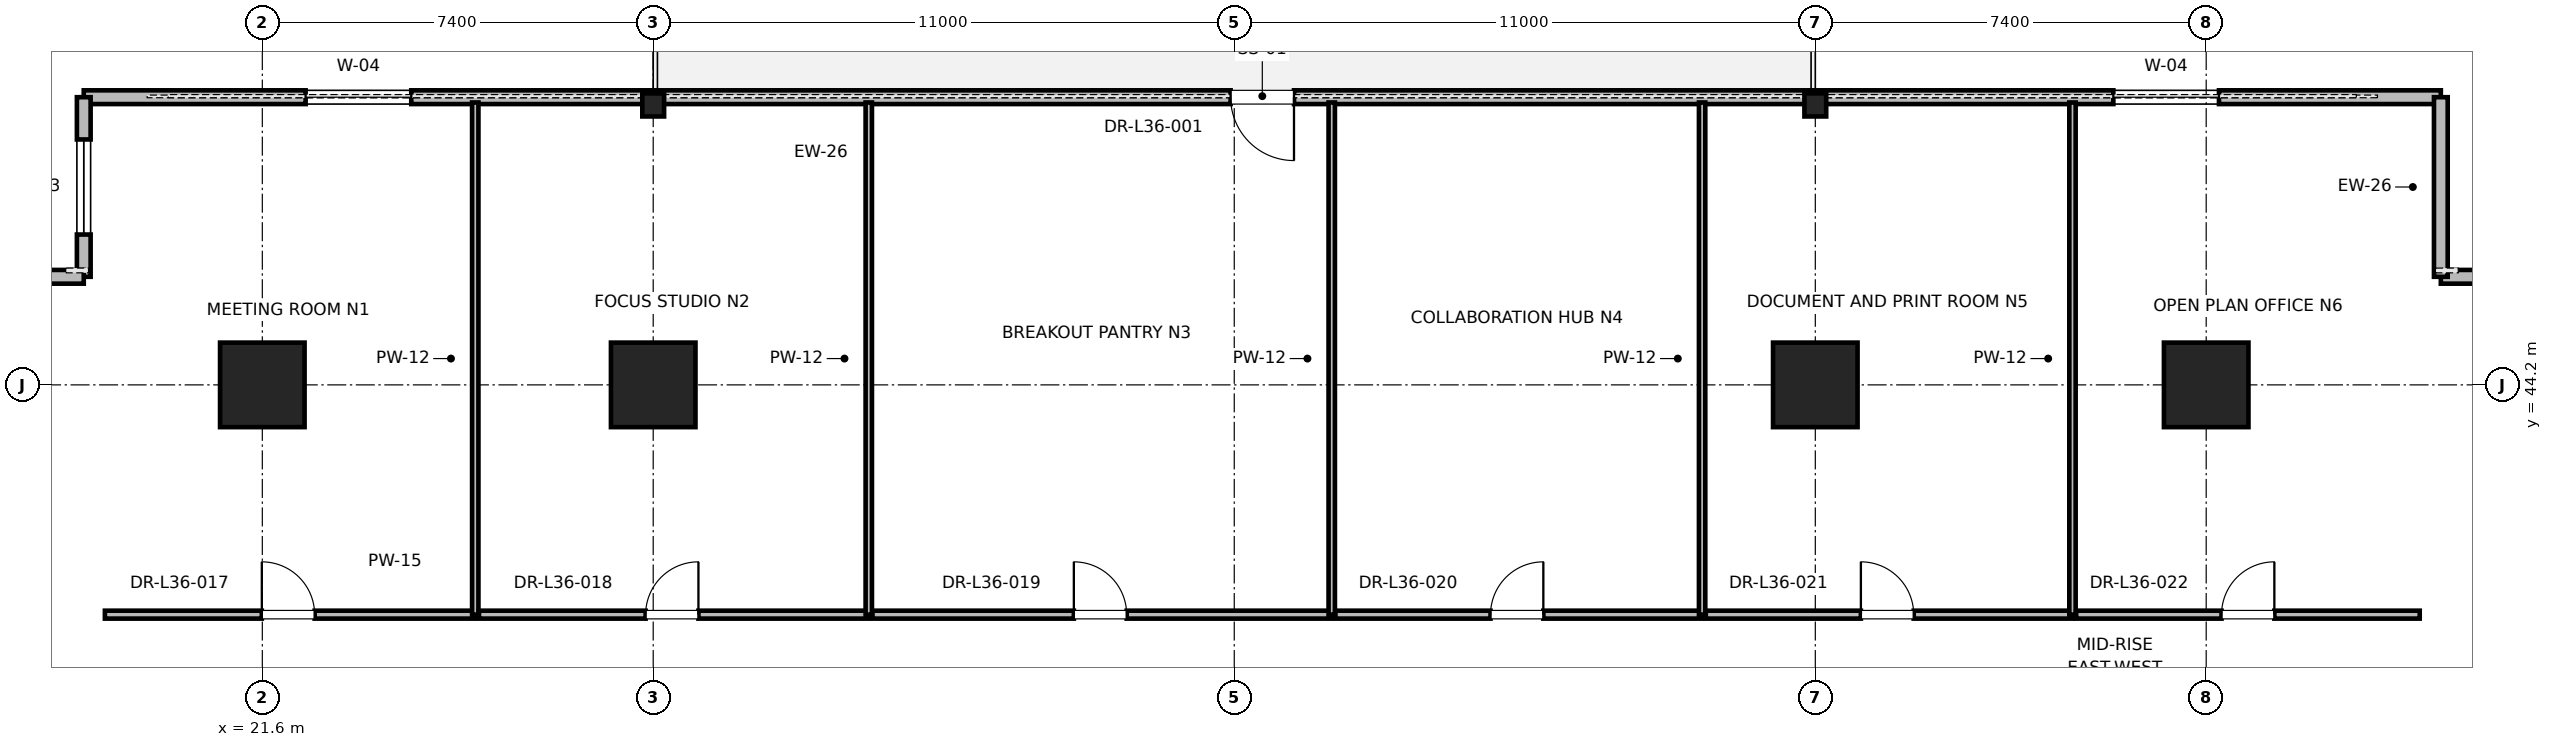
"""IFC4 building model, lengths in metres.
Left out: names, types, materials, properties, quantities, classifications, styles, units other than length and angle.
Written with IfcOpenShell. Run it as: python <this file> out.ifc"""

import sys

from ifc_helpers import new_model, si_unit, direction, frame, frame_2d, origin, origin_2d, place, context, subcontext, project, spatial, rectangle, i_section, extrude, element, fill, save


model = new_model("IFC4")
c1 = context("Model", 3, precision=1e-05, world=origin(), true_north=direction((0.0, 1.0)))
c2 = subcontext(c1, "Body", "Model", "MODEL_VIEW")
j1 = project(units=[si_unit("LENGTHUNIT", "METRE"), si_unit("PLANEANGLEUNIT", "RADIAN")], contexts=[c1])
p1 = place(None, origin())
s1 = spatial("IfcSite", under=j1, at=p1, CompositionType="ELEMENT")
p2 = place(p1, origin())
s2 = spatial("IfcBuilding", under=s1, at=p2, CompositionType="ELEMENT")
p3 = place(p2, frame((0.0, 0.0, 156.4)))
s3 = spatial("IfcBuildingStorey", under=s2, at=p3, CompositionType="ELEMENT", Elevation=156.4)
for number, where, z_axis, x_axis in (
    (1, (29.0, 44.2, 0.0), (0.0, 0.0, 1.0), (1.0, 0.0, 0.0)),
    (2, (51.0, 44.2, 0.0), (0.0, 0.0, 1.0), (1.0, 0.0, 0.0)),
    (3, (21.6, 44.2, 0.0), (0.0, 0.0, 1.0), (1.0, 0.0, 0.0)),
    (4, (58.4, 44.2, 0.0), (0.0, 0.0, 1.0), (1.0, 0.0, 0.0)),
):
    element("IfcColumn", number, at=place(p3, frame(where, z_axis=z_axis, x_axis=x_axis)), inside=s3, PredefinedType="COLUMN", context=c2, shape_type="SweptSolid", body=[
        extrude(rectangle(XDim=1.6, YDim=1.6, at=origin_2d()), origin(), (0.0, 0.0, 1.0), 4.0),
    ])
for number, where, z_axis, x_axis in (
    (5, (29.0, 49.5, 0.0), (0.0, 0.0, 1.0), (1.0, 0.0, 0.0)),
    (6, (51.0, 49.5, 0.0), (0.0, 0.0, 1.0), (1.0, 0.0, 0.0)),
):
    element("IfcColumn", number, at=place(p3, frame(where, z_axis=z_axis, x_axis=x_axis)), inside=s3, PredefinedType="COLUMN", context=c2, shape_type="SweptSolid", body=[
        extrude(i_section(OverallWidth=0.412, OverallDepth=0.437, WebThickness=0.036, FlangeThickness=0.058, FilletRadius=0.015, at=origin_2d()), origin(), (0.0, 0.0, 1.0), 4.0),
    ])
p4 = place(p3, frame((62.842, 49.646, 0.0), z_axis=(0.0, 0.0, 1.0), x_axis=(-1.0, 0.0, 0.0)))
e7 = element("IfcWall", 7, at=p4, inside=s3, PredefinedType="PARAPET", context=c2, shape_type="SweptSolid", body=[
    extrude(rectangle(XDim=44.622, YDim=0.26, at=frame_2d((22.311, 0.0))), origin(), (0.0, 0.0, 1.0), 2.97),
])
p5 = place(p4, frame((4.2, 0.0, 0.85)))
e8 = element("IfcOpeningElement", 8, at=p5, cuts=e7, PredefinedType="OPENING", context=c2, shape_type="SweptSolid", body=[
    extrude(rectangle(XDim=2.0, YDim=2.3, at=frame_2d((1.0, 1.15))), frame((0.0, 0.13, 0.0), z_axis=(0.0, -1.0, 0.0), x_axis=(1.0, 0.0, 0.0)), (0.0, 0.0, 1.0), 0.26),
])
p6 = place(p4, frame((21.711, 0.0, 0.0)))
e9 = element("IfcOpeningElement", 9, at=p6, cuts=e7, PredefinedType="OPENING", context=c2, shape_type="SweptSolid", body=[
    extrude(rectangle(XDim=1.2, YDim=2.2, at=frame_2d((0.6, 1.1))), frame((0.0, 0.13, 0.0), z_axis=(0.0, -1.0, 0.0), x_axis=(1.0, 0.0, 0.0)), (0.0, 0.0, 1.0), 0.26),
])
p7 = place(p4, frame((38.422, 0.0, 0.85)))
e10 = element("IfcOpeningElement", 10, at=p7, cuts=e7, PredefinedType="OPENING", context=c2, shape_type="SweptSolid", body=[
    extrude(rectangle(XDim=2.0, YDim=2.3, at=frame_2d((1.0, 1.15))), frame((0.0, 0.13, 0.0), z_axis=(0.0, -1.0, 0.0), x_axis=(1.0, 0.0, 0.0)), (0.0, 0.0, 1.0), 0.26),
])
p8 = place(p3, frame((66.642, 46.246, 0.0), z_axis=(0.0, 0.0, 1.0), x_axis=(-1.0, 0.0, 0.0)))
e11 = element("IfcWall", 11, at=p8, inside=s3, PredefinedType="PARAPET", context=c2, shape_type="SweptSolid", body=[
    extrude(rectangle(XDim=3.8, YDim=0.26, at=frame_2d((1.9, 0.0))), origin(), (0.0, 0.0, 1.0), 3.775),
])
p9 = place(p8, frame((1.0, 0.0, 0.85)))
e12 = element("IfcOpeningElement", 12, at=p9, cuts=e11, PredefinedType="OPENING", context=c2, shape_type="SweptSolid", body=[
    extrude(rectangle(XDim=1.8, YDim=2.2, at=frame_2d((0.9, 1.1))), frame((0.0, 0.13, 0.0), z_axis=(0.0, -1.0, 0.0), x_axis=(1.0, 0.0, 0.0)), (0.0, 0.0, 1.0), 0.26),
])
p10 = place(p3, frame((62.842, 46.246, 0.0), z_axis=(0.0, 0.0, 1.0), x_axis=(0.0, 1.0, 0.0)))
e13 = element("IfcWall", 13, at=p10, inside=s3, PredefinedType="PARAPET", context=c2, shape_type="SweptSolid", body=[
    extrude(rectangle(XDim=3.4, YDim=0.26, at=frame_2d((1.7, 0.0))), origin(), (0.0, 0.0, 1.0), 3.775),
])
p11 = place(p3, frame((18.22, 49.646, 0.0), z_axis=(0.0, 0.0, 1.0), x_axis=(0.0, -1.0, 0.0)))
e14 = element("IfcWall", 14, at=p11, inside=s3, PredefinedType="PARAPET", context=c2, shape_type="SweptSolid", body=[
    extrude(rectangle(XDim=3.4, YDim=0.26, at=frame_2d((1.7, 0.0))), origin(), (0.0, 0.0, 1.0), 3.775),
])
p12 = place(p11, frame((0.8, 0.0, 0.85)))
e15 = element("IfcOpeningElement", 15, at=p12, cuts=e14, PredefinedType="OPENING", context=c2, shape_type="SweptSolid", body=[
    extrude(rectangle(XDim=1.8, YDim=2.2, at=frame_2d((0.9, 1.1))), frame((0.0, 0.13, 0.0), z_axis=(0.0, -1.0, 0.0), x_axis=(1.0, 0.0, 0.0)), (0.0, 0.0, 1.0), 0.26),
])
p13 = place(p3, frame((18.22, 46.246, 0.0), z_axis=(0.0, 0.0, 1.0), x_axis=(-1.0, 0.0, 0.0)))
e16 = element("IfcWall", 16, at=p13, inside=s3, PredefinedType="PARAPET", context=c2, shape_type="SweptSolid", body=[
    extrude(rectangle(XDim=3.8, YDim=0.26, at=frame_2d((1.9, 0.0))), origin(), (0.0, 0.0, 1.0), 3.775),
])
p14 = place(p3, frame((18.62, 39.85, 0.0), z_axis=(0.0, 0.0, 1.0), x_axis=(1.0, 0.0, 0.0)))
e17 = element("IfcWall", 17, at=p14, inside=s3, PredefinedType="PARTITIONING", context=c2, shape_type="SweptSolid", body=[
    extrude(rectangle(XDim=7.012, YDim=0.15, at=frame_2d((3.506, 0.0))), origin(), (0.0, 0.0, 1.0), 2.85),
])
p15 = place(p14, frame((2.971, 0.0, 0.0)))
e18 = element("IfcOpeningElement", 18, at=p15, cuts=e17, PredefinedType="OPENING", context=c2, shape_type="SweptSolid", body=[
    extrude(rectangle(XDim=1.0, YDim=2.15, at=frame_2d((0.5, 1.075))), frame((0.0, 0.075, 0.0), z_axis=(0.0, -1.0, 0.0), x_axis=(1.0, 0.0, 0.0)), (0.0, 0.0, 1.0), 0.15),
])
p16 = place(p3, frame((25.631, 39.85, 0.0), z_axis=(0.0, 0.0, 1.0), x_axis=(0.0, 1.0, 0.0)))
e19 = element("IfcWall", 19, at=p16, inside=s3, PredefinedType="PARTITIONING", context=c2, shape_type="SweptSolid", body=[
    extrude(rectangle(XDim=9.696, YDim=0.12, at=frame_2d((4.848, 0.0))), origin(), (0.0, 0.0, 1.0), 2.85),
])
p17 = place(p3, frame((25.701, 39.85, 0.0), z_axis=(0.0, 0.0, 1.0), x_axis=(1.0, 0.0, 0.0)))
e20 = element("IfcWall", 20, at=p17, inside=s3, PredefinedType="PARTITIONING", context=c2, shape_type="SweptSolid", body=[
    extrude(rectangle(XDim=7.38, YDim=0.15, at=frame_2d((3.69, 0.0))), origin(), (0.0, 0.0, 1.0), 2.85),
])
p18 = place(p17, frame((3.155, 0.0, 0.0)))
e21 = element("IfcOpeningElement", 21, at=p18, cuts=e20, PredefinedType="OPENING", context=c2, shape_type="SweptSolid", body=[
    extrude(rectangle(XDim=1.0, YDim=2.15, at=frame_2d((0.5, 1.075))), frame((0.0, 0.075, 0.0), z_axis=(0.0, -1.0, 0.0), x_axis=(1.0, 0.0, 0.0)), (0.0, 0.0, 1.0), 0.15),
])
p19 = place(p3, frame((33.081, 39.85, 0.0), z_axis=(0.0, 0.0, 1.0), x_axis=(0.0, 1.0, 0.0)))
e22 = element("IfcWall", 22, at=p19, inside=s3, PredefinedType="PARTITIONING", context=c2, shape_type="SweptSolid", body=[
    extrude(rectangle(XDim=9.696, YDim=0.12, at=frame_2d((4.848, 0.0))), origin(), (0.0, 0.0, 1.0), 2.405),
])
p20 = place(p3, frame((33.151, 39.85, 0.0), z_axis=(0.0, 0.0, 1.0), x_axis=(1.0, 0.0, 0.0)))
e23 = element("IfcWall", 23, at=p20, inside=s3, PredefinedType="PARTITIONING", context=c2, shape_type="SweptSolid", body=[
    extrude(rectangle(XDim=8.694, YDim=0.15, at=frame_2d((4.347, 0.0))), origin(), (0.0, 0.0, 1.0), 2.85),
])
p21 = place(p20, frame((3.812, 0.0, 0.0)))
e24 = element("IfcOpeningElement", 24, at=p21, cuts=e23, PredefinedType="OPENING", context=c2, shape_type="SweptSolid", body=[
    extrude(rectangle(XDim=1.0, YDim=2.15, at=frame_2d((0.5, 1.075))), frame((0.0, 0.075, 0.0), z_axis=(0.0, -1.0, 0.0), x_axis=(1.0, 0.0, 0.0)), (0.0, 0.0, 1.0), 0.15),
])
p22 = place(p3, frame((41.845, 39.85, 0.0), z_axis=(0.0, 0.0, 1.0), x_axis=(0.0, 1.0, 0.0)))
e25 = element("IfcWall", 25, at=p22, inside=s3, PredefinedType="PARTITIONING", context=c2, shape_type="SweptSolid", body=[
    extrude(rectangle(XDim=9.696, YDim=0.12, at=frame_2d((4.848, 0.0))), origin(), (0.0, 0.0, 1.0), 2.405),
])
p23 = place(p3, frame((41.916, 39.85, 0.0), z_axis=(0.0, 0.0, 1.0), x_axis=(1.0, 0.0, 0.0)))
e26 = element("IfcWall", 26, at=p23, inside=s3, PredefinedType="PARTITIONING", context=c2, shape_type="SweptSolid", body=[
    extrude(rectangle(XDim=6.942, YDim=0.15, at=frame_2d((3.471, 0.0))), origin(), (0.0, 0.0, 1.0), 2.85),
])
p24 = place(p23, frame((2.936, 0.0, 0.0)))
e27 = element("IfcOpeningElement", 27, at=p24, cuts=e26, PredefinedType="OPENING", context=c2, shape_type="SweptSolid", body=[
    extrude(rectangle(XDim=1.0, YDim=2.15, at=frame_2d((0.5, 1.075))), frame((0.0, 0.075, 0.0), z_axis=(0.0, -1.0, 0.0), x_axis=(1.0, 0.0, 0.0)), (0.0, 0.0, 1.0), 0.15),
])
p25 = place(p3, frame((48.857, 39.85, 0.0), z_axis=(0.0, 0.0, 1.0), x_axis=(0.0, 1.0, 0.0)))
e28 = element("IfcWall", 28, at=p25, inside=s3, PredefinedType="PARTITIONING", context=c2, shape_type="SweptSolid", body=[
    extrude(rectangle(XDim=9.696, YDim=0.12, at=frame_2d((4.848, 0.0))), origin(), (0.0, 0.0, 1.0), 2.405),
])
p26 = place(p3, frame((48.927, 39.85, 0.0), z_axis=(0.0, 0.0, 1.0), x_axis=(1.0, 0.0, 0.0)))
e29 = element("IfcWall", 29, at=p26, inside=s3, PredefinedType="PARTITIONING", context=c2, shape_type="SweptSolid", body=[
    extrude(rectangle(XDim=6.942, YDim=0.15, at=frame_2d((3.471, 0.0))), origin(), (0.0, 0.0, 1.0), 2.85),
])
p27 = place(p26, frame((2.936, 0.0, 0.0)))
e30 = element("IfcOpeningElement", 30, at=p27, cuts=e29, PredefinedType="OPENING", context=c2, shape_type="SweptSolid", body=[
    extrude(rectangle(XDim=1.0, YDim=2.15, at=frame_2d((0.5, 1.075))), frame((0.0, 0.075, 0.0), z_axis=(0.0, -1.0, 0.0), x_axis=(1.0, 0.0, 0.0)), (0.0, 0.0, 1.0), 0.15),
])
p28 = place(p3, frame((55.869, 39.85, 0.0), z_axis=(0.0, 0.0, 1.0), x_axis=(0.0, 1.0, 0.0)))
e31 = element("IfcWall", 31, at=p28, inside=s3, PredefinedType="PARTITIONING", context=c2, shape_type="SweptSolid", body=[
    extrude(rectangle(XDim=9.696, YDim=0.12, at=frame_2d((4.848, 0.0))), origin(), (0.0, 0.0, 1.0), 2.85),
])
p29 = place(p3, frame((55.939, 39.85, 0.0), z_axis=(0.0, 0.0, 1.0), x_axis=(1.0, 0.0, 0.0)))
e32 = element("IfcWall", 32, at=p29, inside=s3, PredefinedType="PARTITIONING", context=c2, shape_type="SweptSolid", body=[
    extrude(rectangle(XDim=6.503, YDim=0.15, at=frame_2d((3.251, 0.0))), origin(), (0.0, 0.0, 1.0), 2.85),
])
p30 = place(p29, frame((2.752, 0.0, 0.0)))
e33 = element("IfcOpeningElement", 33, at=p30, cuts=e32, PredefinedType="OPENING", context=c2, shape_type="SweptSolid", body=[
    extrude(rectangle(XDim=1.0, YDim=2.15, at=frame_2d((0.5, 1.075))), frame((0.0, 0.075, 0.0), z_axis=(0.0, -1.0, 0.0), x_axis=(1.0, 0.0, 0.0)), (0.0, 0.0, 1.0), 0.15),
])
p31 = place(p5, origin())
e34 = element("IfcWindow", 34, at=p31, inside=s3, PartitioningType="SINGLE_PANEL", PredefinedType="WINDOW", context=c2, shape_type="SweptSolid", body=[
    extrude(rectangle(XDim=2.0, YDim=2.3, at=frame_2d((1.0, 1.15))), frame((0.0, 0.03, 0.0), z_axis=(0.0, -1.0, 0.0), x_axis=(1.0, 0.0, 0.0)), (0.0, 0.0, 1.0), 0.06),
])
fill(e8, e34)
p32 = place(p6, origin())
e35 = element("IfcDoor", 35, at=p32, inside=s3, OperationType="SINGLE_SWING_LEFT", PredefinedType="DOOR", context=c2, shape_type="SweptSolid", body=[
    extrude(rectangle(XDim=1.2, YDim=2.2, at=frame_2d((0.6, 1.1))), frame((0.0, 0.025, 0.0), z_axis=(0.0, -1.0, 0.0), x_axis=(1.0, 0.0, 0.0)), (0.0, 0.0, 1.0), 0.05),
])
fill(e9, e35)
p33 = place(p7, origin())
e36 = element("IfcWindow", 36, at=p33, inside=s3, PartitioningType="SINGLE_PANEL", PredefinedType="WINDOW", context=c2, shape_type="SweptSolid", body=[
    extrude(rectangle(XDim=2.0, YDim=2.3, at=frame_2d((1.0, 1.15))), frame((0.0, 0.03, 0.0), z_axis=(0.0, -1.0, 0.0), x_axis=(1.0, 0.0, 0.0)), (0.0, 0.0, 1.0), 0.06),
])
fill(e10, e36)
p34 = place(p12, origin())
e37 = element("IfcWindow", 37, at=p34, inside=s3, PartitioningType="SINGLE_PANEL", PredefinedType="WINDOW", context=c2, shape_type="SweptSolid", body=[
    extrude(rectangle(XDim=1.8, YDim=2.2, at=frame_2d((0.9, 1.1))), frame((0.0, 0.03, 0.0), z_axis=(0.0, -1.0, 0.0), x_axis=(1.0, 0.0, 0.0)), (0.0, 0.0, 1.0), 0.06),
])
fill(e15, e37)
p35 = place(p15, origin())
e38 = element("IfcDoor", 38, at=p35, inside=s3, OperationType="SINGLE_SWING_LEFT", PredefinedType="DOOR", context=c2, shape_type="SweptSolid", body=[
    extrude(rectangle(XDim=1.0, YDim=2.15, at=frame_2d((0.5, 1.075))), frame((0.0, 0.025, 0.0), z_axis=(0.0, -1.0, 0.0), x_axis=(1.0, 0.0, 0.0)), (0.0, 0.0, 1.0), 0.05),
])
fill(e18, e38)
p36 = place(p18, origin())
e39 = element("IfcDoor", 39, at=p36, inside=s3, OperationType="SINGLE_SWING_RIGHT", PredefinedType="DOOR", context=c2, shape_type="SweptSolid", body=[
    extrude(rectangle(XDim=1.0, YDim=2.15, at=frame_2d((0.5, 1.075))), frame((0.0, 0.025, 0.0), z_axis=(0.0, -1.0, 0.0), x_axis=(1.0, 0.0, 0.0)), (0.0, 0.0, 1.0), 0.05),
])
fill(e21, e39)
p37 = place(p21, origin())
e40 = element("IfcDoor", 40, at=p37, inside=s3, OperationType="SINGLE_SWING_LEFT", PredefinedType="DOOR", context=c2, shape_type="SweptSolid", body=[
    extrude(rectangle(XDim=1.0, YDim=2.15, at=frame_2d((0.5, 1.075))), frame((0.0, 0.025, 0.0), z_axis=(0.0, -1.0, 0.0), x_axis=(1.0, 0.0, 0.0)), (0.0, 0.0, 1.0), 0.05),
])
fill(e24, e40)
p38 = place(p24, origin())
e41 = element("IfcDoor", 41, at=p38, inside=s3, OperationType="SINGLE_SWING_RIGHT", PredefinedType="DOOR", context=c2, shape_type="SweptSolid", body=[
    extrude(rectangle(XDim=1.0, YDim=2.15, at=frame_2d((0.5, 1.075))), frame((0.0, 0.025, 0.0), z_axis=(0.0, -1.0, 0.0), x_axis=(1.0, 0.0, 0.0)), (0.0, 0.0, 1.0), 0.05),
])
fill(e27, e41)
p39 = place(p27, origin())
e42 = element("IfcDoor", 42, at=p39, inside=s3, OperationType="SINGLE_SWING_LEFT", PredefinedType="DOOR", context=c2, shape_type="SweptSolid", body=[
    extrude(rectangle(XDim=1.0, YDim=2.15, at=frame_2d((0.5, 1.075))), frame((0.0, 0.025, 0.0), z_axis=(0.0, -1.0, 0.0), x_axis=(1.0, 0.0, 0.0)), (0.0, 0.0, 1.0), 0.05),
])
fill(e30, e42)
p40 = place(p30, origin())
e43 = element("IfcDoor", 43, at=p40, inside=s3, OperationType="SINGLE_SWING_RIGHT", PredefinedType="DOOR", context=c2, shape_type="SweptSolid", body=[
    extrude(rectangle(XDim=1.0, YDim=2.15, at=frame_2d((0.5, 1.075))), frame((0.0, 0.025, 0.0), z_axis=(0.0, -1.0, 0.0), x_axis=(1.0, 0.0, 0.0)), (0.0, 0.0, 1.0), 0.05),
])
fill(e33, e43)
save(model, sys.argv[1])
